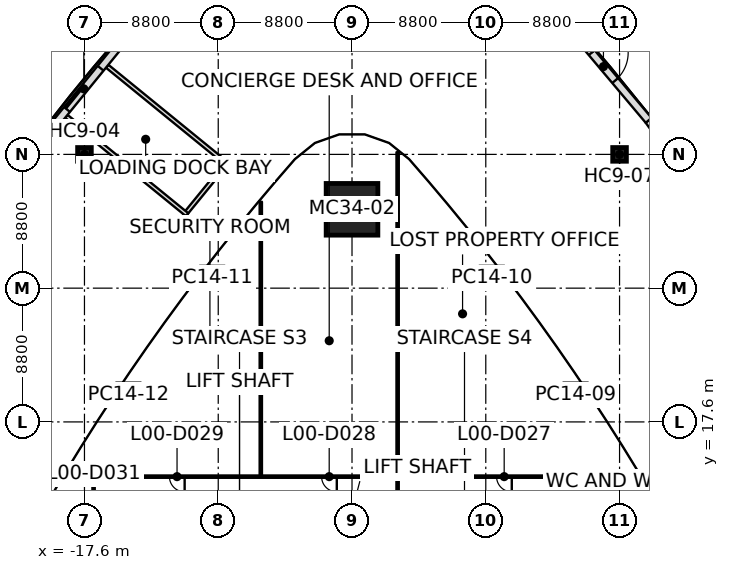
"""IFC4 building model, lengths in metres.
Left out: names, types, materials, properties, quantities, classifications, styles, units other than length and angle.
Written with IfcOpenShell. Run it as: python <this file> out.ifc"""

import sys

from ifc_helpers import new_model, si_unit, direction, frame, frame_2d, origin, origin_2d, place, context, subcontext, project, spatial, rectangle, extrude, element, fill, save


model = new_model("IFC4")
c1 = context("Model", 3, precision=1e-05, world=origin(), true_north=direction((0.0, 1.0)))
c2 = subcontext(c1, "Body", "Model", "MODEL_VIEW")
j1 = project(units=[si_unit("LENGTHUNIT", "METRE"), si_unit("PLANEANGLEUNIT", "RADIAN")], contexts=[c1])
p1 = place(None, origin())
s1 = spatial("IfcSite", under=j1, at=p1, CompositionType="ELEMENT")
p2 = place(p1, origin())
s2 = spatial("IfcBuilding", under=s1, at=p2, CompositionType="ELEMENT")
p3 = place(p2, origin())
s3 = spatial("IfcBuildingStorey", under=s2, at=p3, CompositionType="ELEMENT", Elevation=0.0)
p4 = place(p3, frame((0.0, 31.587, 0.0), z_axis=(0.0, 0.0, 1.0), x_axis=(1.0, 0.0, 0.0)))
e1 = element("IfcColumn", 1, at=p4, inside=s3, PredefinedType="COLUMN", context=c2, shape_type="SweptSolid", body=[
    extrude(rectangle(XDim=3.4, YDim=3.4, at=origin_2d()), origin(), (0.0, 0.0, 1.0), 9.0),
])
for number, where, z_axis, x_axis in (
    (2, (14.708, 19.404, 0.0), (0.0, 0.0, 1.0), (-0.556, 0.831, 0.0)),
    (3, (9.197, 27.087, 0.0), (0.0, 0.0, 1.0), (-0.609, 0.793, 0.0)),
    (4, (-9.197, 27.087, 0.0), (0.0, 0.0, 1.0), (0.609, 0.793, 0.0)),
    (5, (-14.708, 19.404, 0.0), (0.0, 0.0, 1.0), (0.556, 0.831, 0.0)),
):
    element("IfcColumn", number, at=place(p3, frame(where, z_axis=z_axis, x_axis=x_axis)), inside=s3, PredefinedType="COLUMN", context=c2, shape_type="SweptSolid", body=[
        extrude(rectangle(XDim=1.4, YDim=1.4, at=origin_2d()), origin(), (0.0, 0.0, 1.0), 9.0),
    ])
for number, where, z_axis, x_axis in (
    (6, (-17.6, 35.2, 0.0), (0.0, 0.0, 1.0), (1.0, 0.0, 0.0)),
    (7, (17.6, 35.2, 0.0), (0.0, 0.0, 1.0), (1.0, 0.0, 0.0)),
):
    element("IfcColumn", number, at=place(p3, frame(where, z_axis=z_axis, x_axis=x_axis)), inside=s3, PredefinedType="COLUMN", context=c2, shape_type="SweptSolid", body=[
        extrude(rectangle(XDim=0.9, YDim=0.9, at=origin_2d()), origin(), (0.0, 0.0, 1.0), 8.34),
    ])
p5 = place(p3, frame((19.513, 37.439, 0.0), z_axis=(0.0, 0.0, 1.0), x_axis=(0.585795123704, -0.810459174199, 0.0)))
e8 = element("IfcWall", 8, at=p5, inside=s3, PredefinedType="STANDARD", context=c2, shape_type="SweptSolid", body=[
    extrude(rectangle(XDim=13.11, YDim=0.5, at=frame_2d((6.555, 0.0))), origin(), (0.0, 0.0, 1.0), 8.75),
])
p6 = place(p3, frame((13.611, 44.458, 0.0), z_axis=(0.0, 0.0, 1.0), x_axis=(0.643621556587, -0.765343904331, 0.0)))
e9 = element("IfcWall", 9, at=p6, inside=s3, PredefinedType="STANDARD", context=c2, shape_type="SweptSolid", body=[
    extrude(rectangle(XDim=9.17, YDim=0.5, at=frame_2d((4.585, 0.0))), origin(), (0.0, 0.0, 1.0), 8.75),
])
p7 = place(p6, frame((3.35, 0.0, 0.0)))
e10 = element("IfcOpeningElement", 10, at=p7, cuts=e9, PredefinedType="OPENING", context=c2, shape_type="SweptSolid", body=[
    extrude(rectangle(XDim=2.4, YDim=2.8, at=frame_2d((1.2, 1.4))), frame((0.0, 0.25, 0.0), z_axis=(0.0, -1.0, 0.0), x_axis=(1.0, 0.0, 0.0)), (0.0, 0.0, 1.0), 0.5),
])
p8 = place(p3, frame((-22.286, 33.813, 0.0), z_axis=(0.0, 0.0, 1.0), x_axis=(0.631745381592, 0.7751759625, 0.0)))
e11 = element("IfcWall", 11, at=p8, inside=s3, PredefinedType="STANDARD", context=c2, shape_type="SweptSolid", body=[
    extrude(rectangle(XDim=13.729, YDim=0.5, at=frame_2d((6.865, 0.0))), origin(), (0.0, 0.0, 1.0), 8.75),
])
p9 = place(p8, frame((5.6, 0.0, 0.0)))
e12 = element("IfcOpeningElement", 12, at=p9, cuts=e11, PredefinedType="OPENING", context=c2, shape_type="SweptSolid", body=[
    extrude(rectangle(XDim=3.5, YDim=4.5, at=frame_2d((1.75, 2.25))), frame((0.0, 0.25, 0.0), z_axis=(0.0, -1.0, 0.0), x_axis=(1.0, 0.0, 0.0)), (0.0, 0.0, 1.0), 0.5),
])
p10 = place(p3, frame((-18.792, 37.705, 0.0), z_axis=(0.0, 0.0, 1.0), x_axis=(0.775168884735, -0.631754066182, 0.0)))
e13 = element("IfcWall", 13, at=p10, inside=s3, PredefinedType="STANDARD", context=c2, shape_type="SweptSolid", body=[
    extrude(rectangle(XDim=10.25, YDim=0.25, at=frame_2d((5.125, 0.0))), origin(), (0.0, 0.0, 1.0), 8.75),
])
p11 = place(p3, frame((-16.107, 41.0, 0.0), z_axis=(0.0, 0.0, 1.0), x_axis=(0.775166726724, -0.631756714076, 0.0)))
e14 = element("IfcWall", 14, at=p11, inside=s3, PredefinedType="STANDARD", context=c2, shape_type="SweptSolid", body=[
    extrude(rectangle(XDim=10.25, YDim=0.25, at=frame_2d((5.125, 0.0))), origin(), (0.0, 0.0, 1.0), 8.75),
])
p12 = place(p3, frame((-11.022, 31.212, 0.0), z_axis=(0.0, 0.0, 1.0), x_axis=(0.631735746186, 0.77518381497, 0.0)))
e15 = element("IfcWall", 15, at=p12, inside=s3, PredefinedType="STANDARD", context=c2, shape_type="SweptSolid", body=[
    extrude(rectangle(XDim=4.5, YDim=0.25, at=frame_2d((2.25, 0.0))), origin(), (0.0, 0.0, 1.0), 8.75),
])
p13 = place(p3, frame((-17.0, 14.0, 0.0), z_axis=(0.0, 0.0, 1.0), x_axis=(-1.0, 0.0, 0.0)))
e16 = element("IfcWall", 16, at=p13, inside=s3, PredefinedType="PARTITIONING", context=c2, shape_type="SweptSolid", body=[
    extrude(rectangle(XDim=1.883, YDim=0.15, at=frame_2d((0.942, 0.0))), origin(), (0.0, 0.0, 1.0), 7.94),
])
p14 = place(p3, frame((-6.0, 14.0, 0.0), z_axis=(0.0, 0.0, 1.0), x_axis=(0.0, 1.0, 0.0)))
e17 = element("IfcWall", 17, at=p14, inside=s3, PredefinedType="PARTITIONING", context=c2, shape_type="SweptSolid", body=[
    extrude(rectangle(XDim=18.081, YDim=0.15, at=frame_2d((9.041, 0.0))), origin(), (0.0, 0.0, 1.0), 7.94),
])
p15 = place(p3, frame((3.001, 14.0, 0.0), z_axis=(0.0, 0.0, 1.0), x_axis=(0.0, 1.0, 0.0)))
e18 = element("IfcWall", 18, at=p15, inside=s3, PredefinedType="PARTITIONING", context=c2, shape_type="SweptSolid", body=[
    extrude(rectangle(XDim=21.344, YDim=0.15, at=frame_2d((10.672, 0.0))), origin(), (0.0, 0.0, 1.0), 7.94),
])
p16 = place(p3, frame((18.883, 14.0, 0.0), z_axis=(0.0, 0.0, 1.0), x_axis=(-1.0, 0.0, 0.0)))
e19 = element("IfcWall", 19, at=p16, inside=s3, PredefinedType="PARTITIONING", context=c2, shape_type="SweptSolid", body=[
    extrude(rectangle(XDim=1.883, YDim=0.15, at=frame_2d((0.942, 0.0))), origin(), (0.0, 0.0, 1.0), 7.94),
])
p17 = place(p3, frame((-17.0, 13.92, 0.0), z_axis=(0.0, 0.0, 1.0), x_axis=(0.0, -1.0, 0.0)))
e20 = element("IfcWall", 20, at=p17, inside=s3, PredefinedType="PARTITIONING", context=c2, shape_type="SweptSolid", body=[
    extrude(rectangle(XDim=27.84, YDim=0.15, at=frame_2d((13.92, 0.0))), origin(), (0.0, 0.0, 1.0), 7.847),
])
p18 = place(p17, frame((9.32, 0.0, 0.0)))
e21 = element("IfcOpeningElement", 21, at=p18, cuts=e20, PredefinedType="OPENING", context=c2, shape_type="SweptSolid", body=[
    extrude(rectangle(XDim=1.0, YDim=2.1, at=frame_2d((0.5, 1.05))), frame((0.0, 0.075, 0.0), z_axis=(0.0, -1.0, 0.0), x_axis=(1.0, 0.0, 0.0)), (0.0, 0.0, 1.0), 0.15),
])
p19 = place(p17, frame((3.27, 0.0, 0.0)))
e22 = element("IfcOpeningElement", 22, at=p19, cuts=e20, PredefinedType="OPENING", context=c2, shape_type="SweptSolid", body=[
    extrude(rectangle(XDim=1.0, YDim=2.1, at=frame_2d((0.5, 1.05))), frame((0.0, 0.075, 0.0), z_axis=(0.0, -1.0, 0.0), x_axis=(1.0, 0.0, 0.0)), (0.0, 0.0, 1.0), 0.15),
])
p20 = place(p17, frame((19.43, 0.0, 0.0)))
e23 = element("IfcOpeningElement", 23, at=p20, cuts=e20, PredefinedType="OPENING", context=c2, shape_type="SweptSolid", body=[
    extrude(rectangle(XDim=1.0, YDim=2.1, at=frame_2d((0.5, 1.05))), frame((0.0, 0.075, 0.0), z_axis=(0.0, -1.0, 0.0), x_axis=(1.0, 0.0, 0.0)), (0.0, 0.0, 1.0), 0.15),
])
p21 = place(p3, frame((2.999, 14.0, 0.0), z_axis=(0.0, 0.0, 1.0), x_axis=(-1.0, 0.0, 0.0)))
e24 = element("IfcWall", 24, at=p21, inside=s3, PredefinedType="PARTITIONING", context=c2, shape_type="SweptSolid", body=[
    extrude(rectangle(XDim=19.919, YDim=0.15, at=frame_2d((9.959, 0.0))), origin(), (0.0, 0.0, 1.0), 7.847),
])
p22 = place(p21, frame((4.0, 0.0, 0.0)))
e25 = element("IfcOpeningElement", 25, at=p22, cuts=e24, PredefinedType="OPENING", context=c2, shape_type="SweptSolid", body=[
    extrude(rectangle(XDim=1.0, YDim=2.1, at=frame_2d((0.5, 1.05))), frame((0.0, 0.075, 0.0), z_axis=(0.0, -1.0, 0.0), x_axis=(1.0, 0.0, 0.0)), (0.0, 0.0, 1.0), 0.15),
])
p23 = place(p21, frame((14.009, 0.0, 0.0)))
e26 = element("IfcOpeningElement", 26, at=p23, cuts=e24, PredefinedType="OPENING", context=c2, shape_type="SweptSolid", body=[
    extrude(rectangle(XDim=1.0, YDim=2.1, at=frame_2d((0.5, 1.05))), frame((0.0, 0.075, 0.0), z_axis=(0.0, -1.0, 0.0), x_axis=(1.0, 0.0, 0.0)), (0.0, 0.0, 1.0), 0.15),
])
p24 = place(p3, frame((2.999, 8.0, 0.0), z_axis=(0.0, 0.0, 1.0), x_axis=(0.0, 1.0, 0.0)))
e27 = element("IfcWall", 27, at=p24, inside=s3, PredefinedType="PARTITIONING", context=c2, shape_type="SweptSolid", body=[
    extrude(rectangle(XDim=6.0, YDim=0.15, at=frame_2d((3.0, 0.0))), origin(), (0.0, 0.0, 1.0), 7.94),
])
p25 = place(p3, frame((16.92, 14.0, 0.0), z_axis=(0.0, 0.0, 1.0), x_axis=(-1.0, 0.0, 0.0)))
e28 = element("IfcWall", 28, at=p25, inside=s3, PredefinedType="PARTITIONING", context=c2, shape_type="SweptSolid", body=[
    extrude(rectangle(XDim=13.919, YDim=0.15, at=frame_2d((6.959, 0.0))), origin(), (0.0, 0.0, 1.0), 7.94),
])
p26 = place(p25, frame((6.409, 0.0, 0.0)))
e29 = element("IfcOpeningElement", 29, at=p26, cuts=e28, PredefinedType="OPENING", context=c2, shape_type="SweptSolid", body=[
    extrude(rectangle(XDim=1.0, YDim=2.1, at=frame_2d((0.5, 1.05))), frame((0.0, 0.075, 0.0), z_axis=(0.0, -1.0, 0.0), x_axis=(1.0, 0.0, 0.0)), (0.0, 0.0, 1.0), 0.15),
])
p27 = place(p3, frame((17.0, -13.92, 0.0), z_axis=(0.0, 0.0, 1.0), x_axis=(0.0, 1.0, 0.0)))
e30 = element("IfcWall", 30, at=p27, inside=s3, PredefinedType="PARTITIONING", context=c2, shape_type="SweptSolid", body=[
    extrude(rectangle(XDim=27.84, YDim=0.15, at=frame_2d((13.92, 0.0))), origin(), (0.0, 0.0, 1.0), 7.847),
])
p28 = place(p27, frame((21.92, 0.0, 0.0)))
e31 = element("IfcOpeningElement", 31, at=p28, cuts=e30, PredefinedType="OPENING", context=c2, shape_type="SweptSolid", body=[
    extrude(rectangle(XDim=1.0, YDim=2.1, at=frame_2d((0.5, 1.05))), frame((0.0, 0.075, 0.0), z_axis=(0.0, -1.0, 0.0), x_axis=(1.0, 0.0, 0.0)), (0.0, 0.0, 1.0), 0.15),
])
p29 = place(p27, frame((7.92, 0.0, 0.0)))
e32 = element("IfcOpeningElement", 32, at=p29, cuts=e30, PredefinedType="OPENING", context=c2, shape_type="SweptSolid", body=[
    extrude(rectangle(XDim=1.0, YDim=2.1, at=frame_2d((0.5, 1.05))), frame((0.0, 0.075, 0.0), z_axis=(0.0, -1.0, 0.0), x_axis=(1.0, 0.0, 0.0)), (0.0, 0.0, 1.0), 0.15),
])
p30 = place(p7, origin())
e33 = element("IfcDoor", 33, at=p30, inside=s3, OperationType="DOUBLE_DOOR_SINGLE_SWING", PredefinedType="DOOR", context=c2, shape_type="SweptSolid", body=[
    extrude(rectangle(XDim=2.4, YDim=2.8, at=frame_2d((1.2, 1.4))), frame((0.0, 0.025, 0.0), z_axis=(0.0, -1.0, 0.0), x_axis=(1.0, 0.0, 0.0)), (0.0, 0.0, 1.0), 0.05),
])
fill(e10, e33)
p31 = place(p9, origin())
e34 = element("IfcDoor", 34, at=p31, inside=s3, OperationType="ROLLINGUP", PredefinedType="DOOR", context=c2, shape_type="SweptSolid", body=[
    extrude(rectangle(XDim=3.5, YDim=4.5, at=frame_2d((1.75, 2.25))), frame((0.0, 0.025, 0.0), z_axis=(0.0, -1.0, 0.0), x_axis=(1.0, 0.0, 0.0)), (0.0, 0.0, 1.0), 0.05),
])
fill(e12, e34)
p32 = place(p26, origin())
e35 = element("IfcDoor", 35, at=p32, inside=s3, OperationType="SINGLE_SWING_LEFT", PredefinedType="DOOR", context=c2, shape_type="SweptSolid", body=[
    extrude(rectangle(XDim=1.0, YDim=2.1, at=frame_2d((0.5, 1.05))), frame((0.0, 0.025, 0.0), z_axis=(0.0, -1.0, 0.0), x_axis=(1.0, 0.0, 0.0)), (0.0, 0.0, 1.0), 0.05),
])
fill(e29, e35)
p33 = place(p22, origin())
e36 = element("IfcDoor", 36, at=p33, inside=s3, OperationType="SINGLE_SWING_RIGHT", PredefinedType="DOOR", context=c2, shape_type="SweptSolid", body=[
    extrude(rectangle(XDim=1.0, YDim=2.1, at=frame_2d((0.5, 1.05))), frame((0.0, 0.025, 0.0), z_axis=(0.0, -1.0, 0.0), x_axis=(1.0, 0.0, 0.0)), (0.0, 0.0, 1.0), 0.05),
])
fill(e25, e36)
p34 = place(p23, origin())
e37 = element("IfcDoor", 37, at=p34, inside=s3, OperationType="SINGLE_SWING_LEFT", PredefinedType="DOOR", context=c2, shape_type="SweptSolid", body=[
    extrude(rectangle(XDim=1.0, YDim=2.1, at=frame_2d((0.5, 1.05))), frame((0.0, 0.025, 0.0), z_axis=(0.0, -1.0, 0.0), x_axis=(1.0, 0.0, 0.0)), (0.0, 0.0, 1.0), 0.05),
])
fill(e26, e37)
save(model, sys.argv[1])
